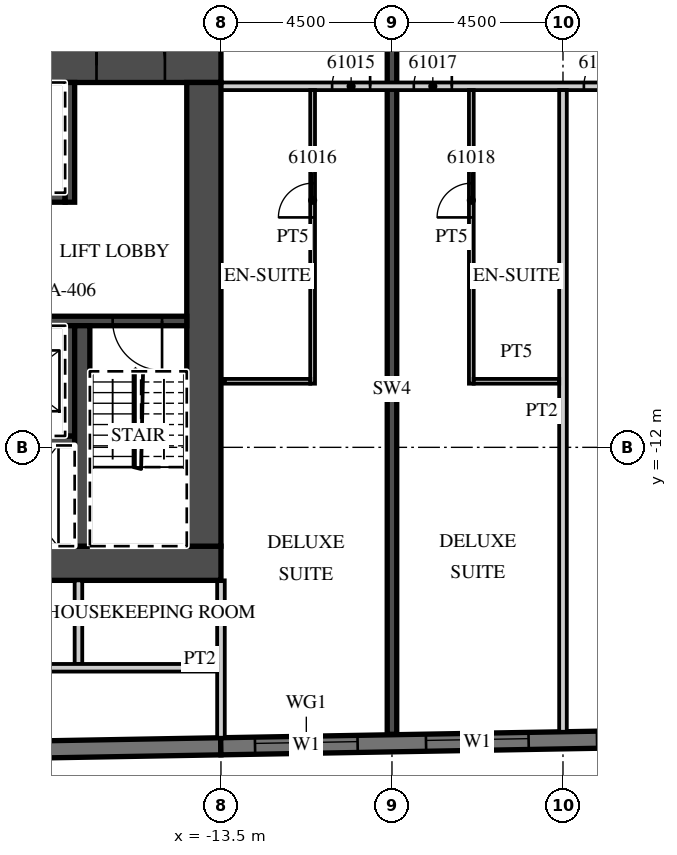
"""IFC4 building model, lengths in metres.
Left out: names, types, materials, properties, quantities, classifications, styles, units other than length and angle.
Written with IfcOpenShell. Run it as: python <this file> out.ifc"""

import sys

from ifc_helpers import new_model, si_unit, direction, frame, frame_2d, origin, place, context, subcontext, project, spatial, rectangle, extrude, element, fill, save


model = new_model("IFC4")
c1 = context("Model", 3, precision=1e-05, world=origin(), true_north=direction((0.0, 1.0)))
c2 = subcontext(c1, "Body", "Model", "MODEL_VIEW")
j1 = project(units=[si_unit("LENGTHUNIT", "METRE"), si_unit("PLANEANGLEUNIT", "RADIAN")], contexts=[c1])
p1 = place(None, origin())
s1 = spatial("IfcSite", under=j1, at=p1, CompositionType="ELEMENT")
p2 = place(p1, origin())
s2 = spatial("IfcBuilding", under=s1, at=p2, CompositionType="ELEMENT")
p3 = place(p2, frame((0.0, 0.0, 247.4)))
s3 = spatial("IfcBuildingStorey", under=s2, at=p3, CompositionType="ELEMENT", Elevation=247.4)
p4 = place(p3, frame((-9.0, -19.55, 0.0), z_axis=(0.0, 0.0, 1.0), x_axis=(0.0, 1.0, 0.0)))
e1 = element("IfcWall", 1, at=p4, inside=s3, PredefinedType="SHEAR", context=c2, shape_type="SweptSolid", body=[
    extrude(rectangle(XDim=18.15, YDim=0.25, at=frame_2d((9.075, 0.0))), origin(), (0.0, 0.0, 1.0), 3.3),
])
p5 = place(p3, frame((-31.504, -20.18, 0.0), z_axis=(0.0, 0.0, 1.0), x_axis=(0.999847677887, 0.017453395744, 0.0)))
e2 = element("IfcWall", 2, at=p5, inside=s3, PredefinedType="SOLIDWALL", context=c2, shape_type="SweptSolid", body=[
    extrude(rectangle(XDim=18.003, YDim=0.45, at=frame_2d((9.001, 0.0))), origin(), (0.0, 0.0, 1.0), 3.02),
])
p6 = place(p3, frame((-13.504, -19.866, 0.0), z_axis=(0.0, 0.0, 1.0), x_axis=(0.999847672978, 0.017453676992, 0.0)))
e3 = element("IfcWall", 3, at=p6, inside=s3, PredefinedType="SOLIDWALL", context=c2, shape_type="SweptSolid", body=[
    extrude(rectangle(XDim=52.86, YDim=0.45, at=frame_2d((26.43, 0.0))), origin(), (0.0, 0.0, 1.0), 3.02),
])
p7 = place(p6, frame((0.9, 0.0, 0.45)))
e4 = element("IfcOpeningElement", 4, at=p7, cuts=e3, PredefinedType="OPENING", context=c2, shape_type="SweptSolid", body=[
    extrude(rectangle(XDim=2.7, YDim=2.25, at=frame_2d((1.35, 1.125))), frame((0.0, 0.235, 0.0), z_axis=(0.0, -1.0, 0.0), x_axis=(1.0, 0.0, 0.0)), (0.0, 0.0, 1.0), 0.47),
])
p8 = place(p6, frame((5.401, 0.0, 0.45)))
e5 = element("IfcOpeningElement", 5, at=p8, cuts=e3, PredefinedType="OPENING", context=c2, shape_type="SweptSolid", body=[
    extrude(rectangle(XDim=2.7, YDim=2.25, at=frame_2d((1.35, 1.125))), frame((0.0, 0.235, 0.0), z_axis=(0.0, -1.0, 0.0), x_axis=(1.0, 0.0, 0.0)), (0.0, 0.0, 1.0), 0.47),
])
p9 = place(p6, frame((9.902, 0.0, 0.45)))
e6 = element("IfcOpeningElement", 6, at=p9, cuts=e3, PredefinedType="OPENING", context=c2, shape_type="SweptSolid", body=[
    extrude(rectangle(XDim=2.7, YDim=2.25, at=frame_2d((1.35, 1.125))), frame((0.0, 0.235, 0.0), z_axis=(0.0, -1.0, 0.0), x_axis=(1.0, 0.0, 0.0)), (0.0, 0.0, 1.0), 0.47),
])
p10 = place(p6, frame((14.402, 0.0, 0.45)))
e7 = element("IfcOpeningElement", 7, at=p10, cuts=e3, PredefinedType="OPENING", context=c2, shape_type="SweptSolid", body=[
    extrude(rectangle(XDim=2.7, YDim=2.25, at=frame_2d((1.35, 1.125))), frame((0.0, 0.235, 0.0), z_axis=(0.0, -1.0, 0.0), x_axis=(1.0, 0.0, 0.0)), (0.0, 0.0, 1.0), 0.47),
])
p11 = place(p6, frame((18.903, 0.0, 0.45)))
e8 = element("IfcOpeningElement", 8, at=p11, cuts=e3, PredefinedType="OPENING", context=c2, shape_type="SweptSolid", body=[
    extrude(rectangle(XDim=2.7, YDim=2.25, at=frame_2d((1.35, 1.125))), frame((0.0, 0.235, 0.0), z_axis=(0.0, -1.0, 0.0), x_axis=(1.0, 0.0, 0.0)), (0.0, 0.0, 1.0), 0.47),
])
p12 = place(p6, frame((23.404, 0.0, 0.45)))
e9 = element("IfcOpeningElement", 9, at=p12, cuts=e3, PredefinedType="OPENING", context=c2, shape_type="SweptSolid", body=[
    extrude(rectangle(XDim=2.7, YDim=2.25, at=frame_2d((1.35, 1.125))), frame((0.0, 0.235, 0.0), z_axis=(0.0, -1.0, 0.0), x_axis=(1.0, 0.0, 0.0)), (0.0, 0.0, 1.0), 0.47),
])
p13 = place(p6, frame((27.904, 0.0, 0.45)))
e10 = element("IfcOpeningElement", 10, at=p13, cuts=e3, PredefinedType="OPENING", context=c2, shape_type="SweptSolid", body=[
    extrude(rectangle(XDim=2.7, YDim=2.25, at=frame_2d((1.35, 1.125))), frame((0.0, 0.235, 0.0), z_axis=(0.0, -1.0, 0.0), x_axis=(1.0, 0.0, 0.0)), (0.0, 0.0, 1.0), 0.47),
])
p14 = place(p6, frame((32.405, 0.0, 0.45)))
e11 = element("IfcOpeningElement", 11, at=p14, cuts=e3, PredefinedType="OPENING", context=c2, shape_type="SweptSolid", body=[
    extrude(rectangle(XDim=2.7, YDim=2.25, at=frame_2d((1.35, 1.125))), frame((0.0, 0.235, 0.0), z_axis=(0.0, -1.0, 0.0), x_axis=(1.0, 0.0, 0.0)), (0.0, 0.0, 1.0), 0.47),
])
p15 = place(p6, frame((36.906, 0.0, 0.45)))
e12 = element("IfcOpeningElement", 12, at=p15, cuts=e3, PredefinedType="OPENING", context=c2, shape_type="SweptSolid", body=[
    extrude(rectangle(XDim=2.7, YDim=2.25, at=frame_2d((1.35, 1.125))), frame((0.0, 0.235, 0.0), z_axis=(0.0, -1.0, 0.0), x_axis=(1.0, 0.0, 0.0)), (0.0, 0.0, 1.0), 0.47),
])
p16 = place(p6, frame((41.406, 0.0, 0.45)))
e13 = element("IfcOpeningElement", 13, at=p16, cuts=e3, PredefinedType="OPENING", context=c2, shape_type="SweptSolid", body=[
    extrude(rectangle(XDim=2.7, YDim=2.25, at=frame_2d((1.35, 1.125))), frame((0.0, 0.235, 0.0), z_axis=(0.0, -1.0, 0.0), x_axis=(1.0, 0.0, 0.0)), (0.0, 0.0, 1.0), 0.47),
])
p17 = place(p6, frame((45.907, 0.0, 0.45)))
e14 = element("IfcOpeningElement", 14, at=p17, cuts=e3, PredefinedType="OPENING", context=c2, shape_type="SweptSolid", body=[
    extrude(rectangle(XDim=2.7, YDim=2.25, at=frame_2d((1.35, 1.125))), frame((0.0, 0.235, 0.0), z_axis=(0.0, -1.0, 0.0), x_axis=(1.0, 0.0, 0.0)), (0.0, 0.0, 1.0), 0.47),
])
p18 = place(p3, frame((-13.5, -19.641, 0.0), z_axis=(0.0, 0.0, 1.0), x_axis=(0.0, 1.0, 0.0)))
e15 = element("IfcWall", 15, at=p18, inside=s3, PredefinedType="PARTITIONING", context=c2, shape_type="SweptSolid", body=[
    extrude(rectangle(XDim=4.141, YDim=0.2, at=frame_2d((2.071, 0.0))), origin(), (0.0, 0.0, 1.0), 3.02),
])
p19 = place(p3, frame((-13.5, -2.5, 0.0), z_axis=(0.0, 0.0, 1.0), x_axis=(1.0, 0.0, 0.0)))
e16 = element("IfcWall", 16, at=p19, inside=s3, PredefinedType="PARTITIONING", context=c2, shape_type="SweptSolid", body=[
    extrude(rectangle(XDim=27.0, YDim=0.2, at=frame_2d((13.5, 0.0))), origin(), (0.0, 0.0, 1.0), 3.02),
])
p20 = place(p19, frame((2.925, 0.0, 0.0)))
e17 = element("IfcOpeningElement", 17, at=p20, cuts=e16, PredefinedType="OPENING", context=c2, shape_type="SweptSolid", body=[
    extrude(rectangle(XDim=1.0, YDim=2.1, at=frame_2d((0.5, 1.05))), frame((0.0, 0.11, 0.0), z_axis=(0.0, -1.0, 0.0), x_axis=(1.0, 0.0, 0.0)), (0.0, 0.0, 1.0), 0.22),
])
p21 = place(p19, frame((5.075, 0.0, 0.0)))
e18 = element("IfcOpeningElement", 18, at=p21, cuts=e16, PredefinedType="OPENING", context=c2, shape_type="SweptSolid", body=[
    extrude(rectangle(XDim=1.0, YDim=2.1, at=frame_2d((0.5, 1.05))), frame((0.0, 0.11, 0.0), z_axis=(0.0, -1.0, 0.0), x_axis=(1.0, 0.0, 0.0)), (0.0, 0.0, 1.0), 0.22),
])
p22 = place(p19, frame((9.55, 0.0, 0.0)))
e19 = element("IfcOpeningElement", 19, at=p22, cuts=e16, PredefinedType="OPENING", context=c2, shape_type="SweptSolid", body=[
    extrude(rectangle(XDim=1.0, YDim=2.1, at=frame_2d((0.5, 1.05))), frame((0.0, 0.11, 0.0), z_axis=(0.0, -1.0, 0.0), x_axis=(1.0, 0.0, 0.0)), (0.0, 0.0, 1.0), 0.22),
])
p23 = place(p19, frame((14.075, 0.0, 0.0)))
e20 = element("IfcOpeningElement", 20, at=p23, cuts=e16, PredefinedType="OPENING", context=c2, shape_type="SweptSolid", body=[
    extrude(rectangle(XDim=1.0, YDim=2.1, at=frame_2d((0.5, 1.05))), frame((0.0, 0.11, 0.0), z_axis=(0.0, -1.0, 0.0), x_axis=(1.0, 0.0, 0.0)), (0.0, 0.0, 1.0), 0.22),
])
p24 = place(p19, frame((20.925, 0.0, 0.0)))
e21 = element("IfcOpeningElement", 21, at=p24, cuts=e16, PredefinedType="OPENING", context=c2, shape_type="SweptSolid", body=[
    extrude(rectangle(XDim=1.0, YDim=2.1, at=frame_2d((0.5, 1.05))), frame((0.0, 0.11, 0.0), z_axis=(0.0, -1.0, 0.0), x_axis=(1.0, 0.0, 0.0)), (0.0, 0.0, 1.0), 0.22),
])
p25 = place(p19, frame((23.075, 0.0, 0.0)))
e22 = element("IfcOpeningElement", 22, at=p25, cuts=e16, PredefinedType="OPENING", context=c2, shape_type="SweptSolid", body=[
    extrude(rectangle(XDim=1.0, YDim=2.1, at=frame_2d((0.5, 1.05))), frame((0.0, 0.11, 0.0), z_axis=(0.0, -1.0, 0.0), x_axis=(1.0, 0.0, 0.0)), (0.0, 0.0, 1.0), 0.22),
])
p26 = place(p3, frame((-11.088, -10.325, 0.0), z_axis=(0.0, 0.0, 1.0), x_axis=(0.0, 1.0, 0.0)))
e23 = element("IfcWall", 23, at=p26, inside=s3, PredefinedType="PARTITIONING", context=c2, shape_type="SweptSolid", body=[
    extrude(rectangle(XDim=7.725, YDim=0.125, at=frame_2d((3.862, 0.0))), origin(), (0.0, 0.0, 1.0), 3.02),
])
p27 = place(p26, frame((4.375, 0.0, 0.0)))
e24 = element("IfcOpeningElement", 24, at=p27, cuts=e23, PredefinedType="OPENING", context=c2, shape_type="SweptSolid", body=[
    extrude(rectangle(XDim=0.9, YDim=2.1, at=frame_2d((0.45, 1.05))), frame((0.0, 0.073, 0.0), z_axis=(0.0, -1.0, 0.0), x_axis=(1.0, 0.0, 0.0)), (0.0, 0.0, 1.0), 0.145),
])
p28 = place(p3, frame((-13.4, -10.262, 0.0), z_axis=(0.0, 0.0, 1.0), x_axis=(1.0, 0.0, 0.0)))
e25 = element("IfcWall", 25, at=p28, inside=s3, PredefinedType="PARTITIONING", context=c2, shape_type="SweptSolid", body=[
    extrude(rectangle(XDim=2.25, YDim=0.125, at=frame_2d((1.125, 0.0))), origin(), (0.0, 0.0, 1.0), 3.02),
])
p29 = place(p3, frame((-4.5, -19.484, 0.0), z_axis=(0.0, 0.0, 1.0), x_axis=(0.0, 1.0, 0.0)))
e26 = element("IfcWall", 26, at=p29, inside=s3, PredefinedType="PARTITIONING", context=c2, shape_type="SweptSolid", body=[
    extrude(rectangle(XDim=16.884, YDim=0.2, at=frame_2d((8.442, 0.0))), origin(), (0.0, 0.0, 1.0), 3.02),
])
p30 = place(p3, frame((-6.912, -10.325, 0.0), z_axis=(0.0, 0.0, 1.0), x_axis=(0.0, 1.0, 0.0)))
e27 = element("IfcWall", 27, at=p30, inside=s3, PredefinedType="PARTITIONING", context=c2, shape_type="SweptSolid", body=[
    extrude(rectangle(XDim=7.725, YDim=0.125, at=frame_2d((3.862, 0.0))), origin(), (0.0, 0.0, 1.0), 3.02),
])
p31 = place(p30, frame((4.375, 0.0, 0.0)))
e28 = element("IfcOpeningElement", 28, at=p31, cuts=e27, PredefinedType="OPENING", context=c2, shape_type="SweptSolid", body=[
    extrude(rectangle(XDim=0.9, YDim=2.1, at=frame_2d((0.45, 1.05))), frame((0.0, 0.073, 0.0), z_axis=(0.0, -1.0, 0.0), x_axis=(1.0, 0.0, 0.0)), (0.0, 0.0, 1.0), 0.145),
])
p32 = place(p3, frame((-6.85, -10.262, 0.0), z_axis=(0.0, 0.0, 1.0), x_axis=(1.0, 0.0, 0.0)))
e29 = element("IfcWall", 29, at=p32, inside=s3, PredefinedType="PARTITIONING", context=c2, shape_type="SweptSolid", body=[
    extrude(rectangle(XDim=2.25, YDim=0.125, at=frame_2d((1.125, 0.0))), origin(), (0.0, 0.0, 1.0), 3.02),
])
p33 = place(p3, frame((-31.5, -1.95, 0.0), z_axis=(0.0, 0.0, 1.0), x_axis=(1.0, 0.0, 0.0)))
e30 = element("IfcWall", 30, at=p33, inside=s3, PredefinedType="SHEAR", context=c2, shape_type="SweptSolid", body=[
    extrude(rectangle(XDim=18.0, YDim=0.9, at=frame_2d((9.0, 0.0))), origin(), (0.0, 0.0, 1.0), 3.02),
])
p34 = place(p33, frame((14.725, 0.0, 0.0)))
e31 = element("IfcOpeningElement", 31, at=p34, cuts=e30, PredefinedType="OPENING", context=c2, shape_type="SweptSolid", body=[
    extrude(rectangle(XDim=1.8, YDim=2.1, at=frame_2d((0.9, 1.05))), frame((0.0, 0.46, 0.0), z_axis=(0.0, -1.0, 0.0), x_axis=(1.0, 0.0, 0.0)), (0.0, 0.0, 1.0), 0.92),
])
p35 = place(p3, frame((-20.3, -15.05, 0.0), z_axis=(0.0, 0.0, 1.0), x_axis=(1.0, 0.0, 0.0)))
e32 = element("IfcWall", 32, at=p35, inside=s3, PredefinedType="SHEAR", context=c2, shape_type="SweptSolid", body=[
    extrude(rectangle(XDim=6.8, YDim=0.9, at=frame_2d((3.4, 0.0))), origin(), (0.0, 0.0, 1.0), 3.02),
])
p36 = place(p35, frame((0.875, 0.0, 0.0)))
e33 = element("IfcOpeningElement", 33, at=p36, cuts=e32, PredefinedType="OPENING", context=c2, shape_type="SweptSolid", body=[
    extrude(rectangle(XDim=1.2, YDim=2.1, at=frame_2d((0.6, 1.05))), frame((0.0, 0.46, 0.0), z_axis=(0.0, -1.0, 0.0), x_axis=(1.0, 0.0, 0.0)), (0.0, 0.0, 1.0), 0.92),
])
p37 = place(p3, frame((-13.95, -14.6, 0.0), z_axis=(0.0, 0.0, 1.0), x_axis=(0.0, 1.0, 0.0)))
e34 = element("IfcWall", 34, at=p37, inside=s3, PredefinedType="SHEAR", context=c2, shape_type="SweptSolid", body=[
    extrude(rectangle(XDim=12.2, YDim=0.9, at=frame_2d((6.1, 0.0))), origin(), (0.0, 0.0, 1.0), 3.02),
])
p38 = place(p3, frame((-30.6, -5.425, 0.0), z_axis=(0.0, 0.0, 1.0), x_axis=(1.0, 0.0, 0.0)))
e35 = element("IfcWall", 35, at=p38, inside=s3, PredefinedType="SHEAR", context=c2, shape_type="SweptSolid", body=[
    extrude(rectangle(XDim=13.0, YDim=0.25, at=frame_2d((6.5, 0.0))), origin(), (0.0, 0.0, 1.0), 3.02),
])
p39 = place(p38, frame((3.325, 0.0, 0.0)))
e36 = element("IfcOpeningElement", 36, at=p39, cuts=e35, PredefinedType="OPENING", context=c2, shape_type="SweptSolid", body=[
    extrude(rectangle(XDim=1.2, YDim=2.1, at=frame_2d((0.6, 1.05))), frame((0.0, 0.135, 0.0), z_axis=(0.0, -1.0, 0.0), x_axis=(1.0, 0.0, 0.0)), (0.0, 0.0, 1.0), 0.27),
])
p40 = place(p38, frame((5.925, 0.0, 0.0)))
e37 = element("IfcOpeningElement", 37, at=p40, cuts=e35, PredefinedType="OPENING", context=c2, shape_type="SweptSolid", body=[
    extrude(rectangle(XDim=1.2, YDim=2.1, at=frame_2d((0.6, 1.05))), frame((0.0, 0.135, 0.0), z_axis=(0.0, -1.0, 0.0), x_axis=(1.0, 0.0, 0.0)), (0.0, 0.0, 1.0), 0.27),
])
p41 = place(p3, frame((-17.475, -5.55, 0.0), z_axis=(0.0, 0.0, 1.0), x_axis=(0.0, 1.0, 0.0)))
e38 = element("IfcWall", 38, at=p41, inside=s3, PredefinedType="SHEAR", context=c2, shape_type="SweptSolid", body=[
    extrude(rectangle(XDim=3.15, YDim=0.25, at=frame_2d((1.575, 0.0))), origin(), (0.0, 0.0, 1.0), 3.02),
])
p42 = place(p3, frame((-30.6, -8.675, 0.0), z_axis=(0.0, 0.0, 1.0), x_axis=(1.0, 0.0, 0.0)))
e39 = element("IfcWall", 39, at=p42, inside=s3, PredefinedType="SHEAR", context=c2, shape_type="SweptSolid", body=[
    extrude(rectangle(XDim=16.2, YDim=0.25, at=frame_2d((8.1, 0.0))), origin(), (0.0, 0.0, 1.0), 3.02),
])
p43 = place(p42, frame((8.55, 0.0, 0.0)))
e40 = element("IfcOpeningElement", 40, at=p43, cuts=e39, PredefinedType="OPENING", context=c2, shape_type="SweptSolid", body=[
    extrude(rectangle(XDim=1.2, YDim=2.1, at=frame_2d((0.6, 1.05))), frame((0.0, 0.135, 0.0), z_axis=(0.0, -1.0, 0.0), x_axis=(1.0, 0.0, 0.0)), (0.0, 0.0, 1.0), 0.27),
])
p44 = place(p42, frame((11.2, 0.0, 0.0)))
e41 = element("IfcOpeningElement", 41, at=p44, cuts=e39, PredefinedType="OPENING", context=c2, shape_type="SweptSolid", body=[
    extrude(rectangle(XDim=1.2, YDim=2.1, at=frame_2d((0.6, 1.05))), frame((0.0, 0.135, 0.0), z_axis=(0.0, -1.0, 0.0), x_axis=(1.0, 0.0, 0.0)), (0.0, 0.0, 1.0), 0.27),
])
p45 = place(p42, frame((14.25, 0.0, 0.0)))
e42 = element("IfcOpeningElement", 42, at=p45, cuts=e39, PredefinedType="OPENING", context=c2, shape_type="SweptSolid", body=[
    extrude(rectangle(XDim=1.3, YDim=2.1, at=frame_2d((0.65, 1.05))), frame((0.0, 0.135, 0.0), z_axis=(0.0, -1.0, 0.0), x_axis=(1.0, 0.0, 0.0)), (0.0, 0.0, 1.0), 0.27),
])
p46 = place(p42, frame((1.087, 0.0, 0.0)))
e43 = element("IfcOpeningElement", 43, at=p46, cuts=e39, PredefinedType="OPENING", context=c2, shape_type="SweptSolid", body=[
    extrude(rectangle(XDim=1.0, YDim=2.1, at=frame_2d((0.5, 1.05))), frame((0.0, 0.135, 0.0), z_axis=(0.0, -1.0, 0.0), x_axis=(1.0, 0.0, 0.0)), (0.0, 0.0, 1.0), 0.27),
])
p47 = place(p42, frame((5.062, 0.0, 0.0)))
e44 = element("IfcOpeningElement", 44, at=p47, cuts=e39, PredefinedType="OPENING", context=c2, shape_type="SweptSolid", body=[
    extrude(rectangle(XDim=1.0, YDim=2.1, at=frame_2d((0.5, 1.05))), frame((0.0, 0.135, 0.0), z_axis=(0.0, -1.0, 0.0), x_axis=(1.0, 0.0, 0.0)), (0.0, 0.0, 1.0), 0.27),
])
p48 = place(p3, frame((-30.6, -11.825, 0.0), z_axis=(0.0, 0.0, 1.0), x_axis=(1.0, 0.0, 0.0)))
e45 = element("IfcWall", 45, at=p48, inside=s3, PredefinedType="SHEAR", context=c2, shape_type="SweptSolid", body=[
    extrude(rectangle(XDim=13.25, YDim=0.25, at=frame_2d((6.625, 0.0))), origin(), (0.0, 0.0, 1.0), 3.02),
])
p49 = place(p3, frame((-17.475, -11.7, 0.0), z_axis=(0.0, 0.0, 1.0), x_axis=(0.0, 1.0, 0.0)))
e46 = element("IfcWall", 46, at=p49, inside=s3, PredefinedType="SHEAR", context=c2, shape_type="SweptSolid", body=[
    extrude(rectangle(XDim=2.9, YDim=0.25, at=frame_2d((1.45, 0.0))), origin(), (0.0, 0.0, 1.0), 3.02),
])
p50 = place(p3, frame((-17.15, -14.6, 0.0), z_axis=(0.0, 0.0, 1.0), x_axis=(0.0, 1.0, 0.0)))
e47 = element("IfcWall", 47, at=p50, inside=s3, PredefinedType="SHEAR", context=c2, shape_type="SweptSolid", body=[
    extrude(rectangle(XDim=5.8, YDim=0.4, at=frame_2d((2.9, 0.0))), origin(), (0.0, 0.0, 1.0), 3.02),
])
p51 = place(p3, frame((-17.25, -17.7, 0.0), z_axis=(0.0, 0.0, 1.0), x_axis=(0.0, 1.0, 0.0)))
e48 = element("IfcWall", 48, at=p51, inside=s3, PredefinedType="PARTITIONING", context=c2, shape_type="SweptSolid", body=[
    extrude(rectangle(XDim=2.2, YDim=0.2, at=frame_2d((1.1, 0.0))), origin(), (0.0, 0.0, 1.0), 3.02),
])
p52 = place(p3, frame((-35.864, -17.8, 0.0), z_axis=(0.0, 0.0, 1.0), x_axis=(1.0, 0.0, 0.0)))
e49 = element("IfcWall", 49, at=p52, inside=s3, PredefinedType="PARTITIONING", context=c2, shape_type="SweptSolid", body=[
    extrude(rectangle(XDim=22.264, YDim=0.2, at=frame_2d((11.132, 0.0))), origin(), (0.0, 0.0, 1.0), 3.02),
])
p53 = place(p52, frame((3.551, 0.0, 0.0)))
e50 = element("IfcOpeningElement", 50, at=p53, cuts=e49, PredefinedType="OPENING", context=c2, shape_type="SweptSolid", body=[
    extrude(rectangle(XDim=0.9, YDim=2.1, at=frame_2d((0.45, 1.05))), frame((0.0, 0.11, 0.0), z_axis=(0.0, -1.0, 0.0), x_axis=(1.0, 0.0, 0.0)), (0.0, 0.0, 1.0), 0.22),
])
p54 = place(p52, frame((11.851, 0.0, 0.0)))
e51 = element("IfcOpeningElement", 51, at=p54, cuts=e49, PredefinedType="OPENING", context=c2, shape_type="SweptSolid", body=[
    extrude(rectangle(XDim=0.9, YDim=2.1, at=frame_2d((0.45, 1.05))), frame((0.0, 0.11, 0.0), z_axis=(0.0, -1.0, 0.0), x_axis=(1.0, 0.0, 0.0)), (0.0, 0.0, 1.0), 0.22),
])
p55 = place(p7, origin())
e52 = element("IfcWindow", 52, at=p55, inside=s3, PartitioningType="SINGLE_PANEL", PredefinedType="WINDOW", context=c2, shape_type="SweptSolid", body=[
    extrude(rectangle(XDim=2.7, YDim=2.25, at=frame_2d((1.35, 1.125))), frame((0.0, 0.09, 0.0), z_axis=(0.0, -1.0, 0.0), x_axis=(1.0, 0.0, 0.0)), (0.0, 0.0, 1.0), 0.06),
])
fill(e4, e52)
p56 = place(p8, origin())
e53 = element("IfcWindow", 53, at=p56, inside=s3, PartitioningType="SINGLE_PANEL", PredefinedType="WINDOW", context=c2, shape_type="SweptSolid", body=[
    extrude(rectangle(XDim=2.7, YDim=2.25, at=frame_2d((1.35, 1.125))), frame((0.0, 0.09, 0.0), z_axis=(0.0, -1.0, 0.0), x_axis=(1.0, 0.0, 0.0)), (0.0, 0.0, 1.0), 0.06),
])
fill(e5, e53)
p57 = place(p9, origin())
e54 = element("IfcWindow", 54, at=p57, inside=s3, PartitioningType="SINGLE_PANEL", PredefinedType="WINDOW", context=c2, shape_type="SweptSolid", body=[
    extrude(rectangle(XDim=2.7, YDim=2.25, at=frame_2d((1.35, 1.125))), frame((0.0, 0.09, 0.0), z_axis=(0.0, -1.0, 0.0), x_axis=(1.0, 0.0, 0.0)), (0.0, 0.0, 1.0), 0.06),
])
fill(e6, e54)
p58 = place(p20, origin())
e55 = element("IfcDoor", 55, at=p58, inside=s3, OperationType="SINGLE_SWING_RIGHT", PredefinedType="DOOR", context=c2, shape_type="SweptSolid", body=[
    extrude(rectangle(XDim=1.0, YDim=2.1, at=frame_2d((0.5, 1.05))), frame((0.0, 0.025, 0.0), z_axis=(0.0, -1.0, 0.0), x_axis=(1.0, 0.0, 0.0)), (0.0, 0.0, 1.0), 0.05),
])
fill(e17, e55)
p59 = place(p27, origin())
e56 = element("IfcDoor", 56, at=p59, inside=s3, OperationType="SINGLE_SWING_LEFT", PredefinedType="DOOR", context=c2, shape_type="SweptSolid", body=[
    extrude(rectangle(XDim=0.9, YDim=2.1, at=frame_2d((0.45, 1.05))), frame((0.0, 0.025, 0.0), z_axis=(0.0, -1.0, 0.0), x_axis=(1.0, 0.0, 0.0)), (0.0, 0.0, 1.0), 0.05),
])
fill(e24, e56)
p60 = place(p21, origin())
e57 = element("IfcDoor", 57, at=p60, inside=s3, OperationType="SINGLE_SWING_RIGHT", PredefinedType="DOOR", context=c2, shape_type="SweptSolid", body=[
    extrude(rectangle(XDim=1.0, YDim=2.1, at=frame_2d((0.5, 1.05))), frame((0.0, 0.025, 0.0), z_axis=(0.0, -1.0, 0.0), x_axis=(1.0, 0.0, 0.0)), (0.0, 0.0, 1.0), 0.05),
])
fill(e18, e57)
p61 = place(p31, origin())
e58 = element("IfcDoor", 58, at=p61, inside=s3, OperationType="SINGLE_SWING_LEFT", PredefinedType="DOOR", context=c2, shape_type="SweptSolid", body=[
    extrude(rectangle(XDim=0.9, YDim=2.1, at=frame_2d((0.45, 1.05))), frame((0.0, 0.025, 0.0), z_axis=(0.0, -1.0, 0.0), x_axis=(1.0, 0.0, 0.0)), (0.0, 0.0, 1.0), 0.05),
])
fill(e28, e58)
p62 = place(p22, origin())
e59 = element("IfcDoor", 59, at=p62, inside=s3, OperationType="SINGLE_SWING_RIGHT", PredefinedType="DOOR", context=c2, shape_type="SweptSolid", body=[
    extrude(rectangle(XDim=1.0, YDim=2.1, at=frame_2d((0.5, 1.05))), frame((0.0, 0.025, 0.0), z_axis=(0.0, -1.0, 0.0), x_axis=(1.0, 0.0, 0.0)), (0.0, 0.0, 1.0), 0.05),
])
fill(e19, e59)
p63 = place(p34, origin())
e60 = element("IfcDoor", 60, at=p63, inside=s3, OperationType="DOUBLE_DOOR_DOUBLE_SWING", PredefinedType="DOOR", context=c2, shape_type="SweptSolid", body=[
    extrude(rectangle(XDim=1.8, YDim=2.1, at=frame_2d((0.9, 1.05))), frame((0.0, 0.025, 0.0), z_axis=(0.0, -1.0, 0.0), x_axis=(1.0, 0.0, 0.0)), (0.0, 0.0, 1.0), 0.05),
])
fill(e31, e60)
p64 = place(p45, origin())
e61 = element("IfcDoor", 61, at=p64, inside=s3, OperationType="SINGLE_SWING_RIGHT", PredefinedType="DOOR", context=c2, shape_type="SweptSolid", body=[
    extrude(rectangle(XDim=1.3, YDim=2.1, at=frame_2d((0.65, 1.05))), frame((0.0, 0.025, 0.0), z_axis=(0.0, -1.0, 0.0), x_axis=(1.0, 0.0, 0.0)), (0.0, 0.0, 1.0), 0.05),
])
fill(e42, e61)
save(model, sys.argv[1])
